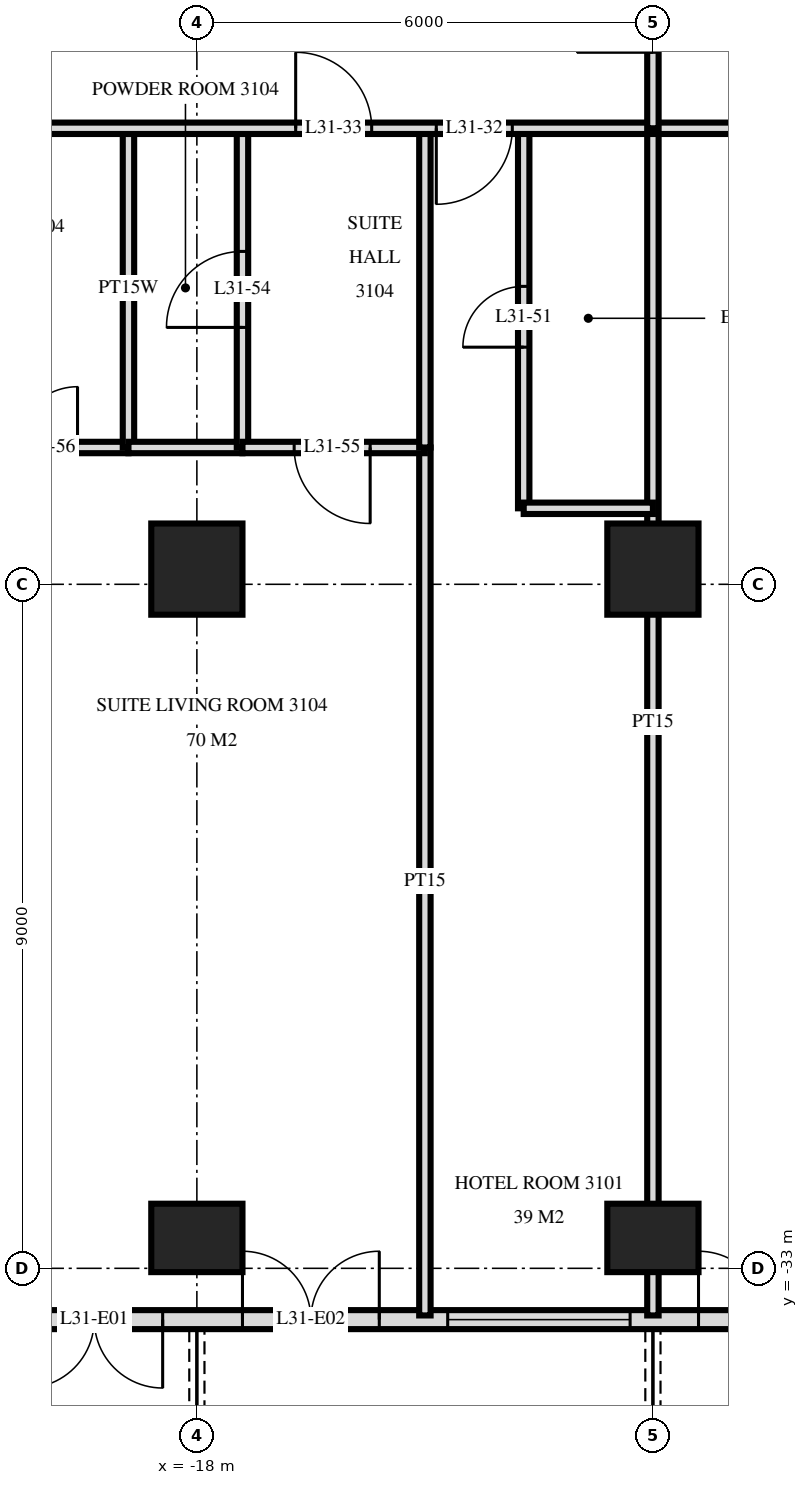
"""IFC4 building model, lengths in metres.
Left out: names, types, materials, properties, quantities, classifications, styles, units other than length and angle.
Written with IfcOpenShell. Run it as: python <this file> out.ifc"""

import sys

from ifc_helpers import new_model, si_unit, direction, frame, frame_2d, origin, origin_2d, place, context, subcontext, project, spatial, rectangle, extrude, element, fill, save


model = new_model("IFC4")
c1 = context("Model", 3, precision=1e-05, world=origin(), true_north=direction((0.0, 1.0)))
c2 = subcontext(c1, "Body", "Model", "MODEL_VIEW")
j1 = project(units=[si_unit("LENGTHUNIT", "METRE"), si_unit("PLANEANGLEUNIT", "RADIAN")], contexts=[c1])
p1 = place(None, origin())
s1 = spatial("IfcSite", under=j1, at=p1, CompositionType="ELEMENT")
p2 = place(p1, origin())
s2 = spatial("IfcBuilding", under=s1, at=p2, CompositionType="ELEMENT")
p3 = place(p2, frame((0.0, 0.0, 123.6)))
s3 = spatial("IfcBuildingStorey", under=s2, at=p3, CompositionType="ELEMENT", Elevation=123.6)
p4 = place(p3, frame((-18.0, -32.6, 0.0), z_axis=(0.0, 0.0, 1.0), x_axis=(1.0, 0.0, 0.0)))
e1 = element("IfcColumn", 1, at=p4, inside=s3, PredefinedType="COLUMN", context=c2, shape_type="SweptSolid", body=[
    extrude(rectangle(XDim=1.2, YDim=0.9, at=origin_2d()), origin(), (0.0, 0.0, 1.0), 3.6),
])
p5 = place(p3, frame((-18.0, -23.8, 0.0), z_axis=(0.0, 0.0, 1.0), x_axis=(1.0, 0.0, 0.0)))
e2 = element("IfcColumn", 2, at=p5, inside=s3, PredefinedType="COLUMN", context=c2, shape_type="SweptSolid", body=[
    extrude(rectangle(XDim=1.2, YDim=1.2, at=origin_2d()), origin(), (0.0, 0.0, 1.0), 3.6),
])
p6 = place(p3, frame((-12.0, -32.6, 0.0), z_axis=(0.0, 0.0, 1.0), x_axis=(1.0, 0.0, 0.0)))
e3 = element("IfcColumn", 3, at=p6, inside=s3, PredefinedType="COLUMN", context=c2, shape_type="SweptSolid", body=[
    extrude(rectangle(XDim=1.2, YDim=0.9, at=origin_2d()), origin(), (0.0, 0.0, 1.0), 3.6),
])
p7 = place(p3, frame((-12.0, -23.8, 0.0), z_axis=(0.0, 0.0, 1.0), x_axis=(1.0, 0.0, 0.0)))
e4 = element("IfcColumn", 4, at=p7, inside=s3, PredefinedType="COLUMN", context=c2, shape_type="SweptSolid", body=[
    extrude(rectangle(XDim=1.2, YDim=1.2, at=origin_2d()), origin(), (0.0, 0.0, 1.0), 3.6),
])
p8 = place(p3, frame((-23.675, -33.675, 0.0), z_axis=(0.0, 0.0, 1.0), x_axis=(1.0, 0.0, 0.0)))
e5 = element("IfcWall", 5, at=p8, inside=s3, PredefinedType="SOLIDWALL", context=c2, shape_type="SweptSolid", body=[
    extrude(rectangle(XDim=47.351, YDim=0.25, at=frame_2d((23.675, 0.0))), origin(), (0.0, 0.0, 1.0), 3.32),
])
p9 = place(p8, frame((3.425, 0.0, 0.0)))
e6 = element("IfcOpeningElement", 6, at=p9, cuts=e5, PredefinedType="OPENING", context=c2, shape_type="SweptSolid", body=[
    extrude(rectangle(XDim=1.8, YDim=2.4, at=frame_2d((0.9, 1.2))), frame((0.0, 0.135, 0.0), z_axis=(0.0, -1.0, 0.0), x_axis=(1.0, 0.0, 0.0)), (0.0, 0.0, 1.0), 0.27),
])
p10 = place(p8, frame((6.275, 0.0, 0.0)))
e7 = element("IfcOpeningElement", 7, at=p10, cuts=e5, PredefinedType="OPENING", context=c2, shape_type="SweptSolid", body=[
    extrude(rectangle(XDim=1.8, YDim=2.4, at=frame_2d((0.9, 1.2))), frame((0.0, 0.135, 0.0), z_axis=(0.0, -1.0, 0.0), x_axis=(1.0, 0.0, 0.0)), (0.0, 0.0, 1.0), 0.27),
])
p11 = place(p8, frame((8.975, 0.0, 0.3)))
e8 = element("IfcOpeningElement", 8, at=p11, cuts=e5, PredefinedType="OPENING", context=c2, shape_type="SweptSolid", body=[
    extrude(rectangle(XDim=2.4, YDim=2.1, at=frame_2d((1.2, 1.05))), frame((0.0, 0.135, 0.0), z_axis=(0.0, -1.0, 0.0), x_axis=(1.0, 0.0, 0.0)), (0.0, 0.0, 1.0), 0.27),
])
p12 = place(p8, frame((12.275, 0.0, 0.0)))
e9 = element("IfcOpeningElement", 9, at=p12, cuts=e5, PredefinedType="OPENING", context=c2, shape_type="SweptSolid", body=[
    extrude(rectangle(XDim=1.8, YDim=2.4, at=frame_2d((0.9, 1.2))), frame((0.0, 0.135, 0.0), z_axis=(0.0, -1.0, 0.0), x_axis=(1.0, 0.0, 0.0)), (0.0, 0.0, 1.0), 0.27),
])
p13 = place(p8, frame((14.975, 0.0, 0.3)))
e10 = element("IfcOpeningElement", 10, at=p13, cuts=e5, PredefinedType="OPENING", context=c2, shape_type="SweptSolid", body=[
    extrude(rectangle(XDim=2.4, YDim=2.1, at=frame_2d((1.2, 1.05))), frame((0.0, 0.135, 0.0), z_axis=(0.0, -1.0, 0.0), x_axis=(1.0, 0.0, 0.0)), (0.0, 0.0, 1.0), 0.27),
])
p14 = place(p8, frame((17.975, 0.0, 0.3)))
e11 = element("IfcOpeningElement", 11, at=p14, cuts=e5, PredefinedType="OPENING", context=c2, shape_type="SweptSolid", body=[
    extrude(rectangle(XDim=2.4, YDim=2.1, at=frame_2d((1.2, 1.05))), frame((0.0, 0.135, 0.0), z_axis=(0.0, -1.0, 0.0), x_axis=(1.0, 0.0, 0.0)), (0.0, 0.0, 1.0), 0.27),
])
p15 = place(p8, frame((21.275, 0.0, 0.0)))
e12 = element("IfcOpeningElement", 12, at=p15, cuts=e5, PredefinedType="OPENING", context=c2, shape_type="SweptSolid", body=[
    extrude(rectangle(XDim=1.8, YDim=2.4, at=frame_2d((0.9, 1.2))), frame((0.0, 0.135, 0.0), z_axis=(0.0, -1.0, 0.0), x_axis=(1.0, 0.0, 0.0)), (0.0, 0.0, 1.0), 0.27),
])
p16 = place(p8, frame((24.275, 0.0, 0.0)))
e13 = element("IfcOpeningElement", 13, at=p16, cuts=e5, PredefinedType="OPENING", context=c2, shape_type="SweptSolid", body=[
    extrude(rectangle(XDim=1.8, YDim=2.4, at=frame_2d((0.9, 1.2))), frame((0.0, 0.135, 0.0), z_axis=(0.0, -1.0, 0.0), x_axis=(1.0, 0.0, 0.0)), (0.0, 0.0, 1.0), 0.27),
])
p17 = place(p8, frame((26.975, 0.0, 0.3)))
e14 = element("IfcOpeningElement", 14, at=p17, cuts=e5, PredefinedType="OPENING", context=c2, shape_type="SweptSolid", body=[
    extrude(rectangle(XDim=2.4, YDim=2.1, at=frame_2d((1.2, 1.05))), frame((0.0, 0.135, 0.0), z_axis=(0.0, -1.0, 0.0), x_axis=(1.0, 0.0, 0.0)), (0.0, 0.0, 1.0), 0.27),
])
p18 = place(p8, frame((30.275, 0.0, 0.0)))
e15 = element("IfcOpeningElement", 15, at=p18, cuts=e5, PredefinedType="OPENING", context=c2, shape_type="SweptSolid", body=[
    extrude(rectangle(XDim=1.8, YDim=2.4, at=frame_2d((0.9, 1.2))), frame((0.0, 0.135, 0.0), z_axis=(0.0, -1.0, 0.0), x_axis=(1.0, 0.0, 0.0)), (0.0, 0.0, 1.0), 0.27),
])
p19 = place(p8, frame((32.975, 0.0, 0.3)))
e16 = element("IfcOpeningElement", 16, at=p19, cuts=e5, PredefinedType="OPENING", context=c2, shape_type="SweptSolid", body=[
    extrude(rectangle(XDim=2.4, YDim=2.1, at=frame_2d((1.2, 1.05))), frame((0.0, 0.135, 0.0), z_axis=(0.0, -1.0, 0.0), x_axis=(1.0, 0.0, 0.0)), (0.0, 0.0, 1.0), 0.27),
])
p20 = place(p8, frame((36.275, 0.0, 0.0)))
e17 = element("IfcOpeningElement", 17, at=p20, cuts=e5, PredefinedType="OPENING", context=c2, shape_type="SweptSolid", body=[
    extrude(rectangle(XDim=1.8, YDim=2.4, at=frame_2d((0.9, 1.2))), frame((0.0, 0.135, 0.0), z_axis=(0.0, -1.0, 0.0), x_axis=(1.0, 0.0, 0.0)), (0.0, 0.0, 1.0), 0.27),
])
p21 = place(p8, frame((38.975, 0.0, 0.3)))
e18 = element("IfcOpeningElement", 18, at=p21, cuts=e5, PredefinedType="OPENING", context=c2, shape_type="SweptSolid", body=[
    extrude(rectangle(XDim=2.4, YDim=2.1, at=frame_2d((1.2, 1.05))), frame((0.0, 0.135, 0.0), z_axis=(0.0, -1.0, 0.0), x_axis=(1.0, 0.0, 0.0)), (0.0, 0.0, 1.0), 0.27),
])
p22 = place(p8, frame((41.975, 0.0, 0.3)))
e19 = element("IfcOpeningElement", 19, at=p22, cuts=e5, PredefinedType="OPENING", context=c2, shape_type="SweptSolid", body=[
    extrude(rectangle(XDim=2.4, YDim=2.1, at=frame_2d((1.2, 1.05))), frame((0.0, 0.135, 0.0), z_axis=(0.0, -1.0, 0.0), x_axis=(1.0, 0.0, 0.0)), (0.0, 0.0, 1.0), 0.27),
])
p23 = place(p8, frame((45.125, 0.0, 0.0)))
e20 = element("IfcOpeningElement", 20, at=p23, cuts=e5, PredefinedType="OPENING", context=c2, shape_type="SweptSolid", body=[
    extrude(rectangle(XDim=1.8, YDim=2.4, at=frame_2d((0.9, 1.2))), frame((0.0, 0.135, 0.0), z_axis=(0.0, -1.0, 0.0), x_axis=(1.0, 0.0, 0.0)), (0.0, 0.0, 1.0), 0.27),
])
p24 = place(p3, frame((-12.0, -18.0, 0.0), z_axis=(0.0, 0.0, 1.0), x_axis=(0.0, 1.0, 0.0)))
e21 = element("IfcWall", 21, at=p24, inside=s3, PredefinedType="PARTITIONING", context=c2, shape_type="SweptSolid", body=[
    extrude(rectangle(XDim=2.95, YDim=0.15, at=frame_2d((1.475, 0.0))), origin(), (0.0, 0.0, 1.0), 3.32),
])
p25 = place(p24, frame((1.0, 0.0, 0.0)))
e22 = element("IfcOpeningElement", 22, at=p25, cuts=e21, PredefinedType="OPENING", context=c2, shape_type="SweptSolid", body=[
    extrude(rectangle(XDim=1.0, YDim=2.1, at=frame_2d((0.5, 1.05))), frame((0.0, 0.085, 0.0), z_axis=(0.0, -1.0, 0.0), x_axis=(1.0, 0.0, 0.0)), (0.0, 0.0, 1.0), 0.17),
])
p26 = place(p3, frame((-12.0, -33.62, 0.0), z_axis=(0.0, 0.0, 1.0), x_axis=(0.0, 1.0, 0.0)))
e23 = element("IfcWall", 23, at=p26, inside=s3, PredefinedType="PARTITIONING", context=c2, shape_type="SweptSolid", body=[
    extrude(rectangle(XDim=15.62, YDim=0.15, at=frame_2d((7.81, 0.0))), origin(), (0.0, 0.0, 1.0), 3.32),
])
p27 = place(p3, frame((-13.7, -23.0, 0.0), z_axis=(0.0, 0.0, 1.0), x_axis=(0.0, 1.0, 0.0)))
e24 = element("IfcWall", 24, at=p27, inside=s3, PredefinedType="PARTITIONING", context=c2, shape_type="SweptSolid", body=[
    extrude(rectangle(XDim=5.0, YDim=0.15, at=frame_2d((2.5, 0.0))), origin(), (0.0, 0.0, 1.0), 3.32),
])
p28 = place(p27, frame((2.12, 0.0, 0.0)))
e25 = element("IfcOpeningElement", 25, at=p28, cuts=e24, PredefinedType="OPENING", context=c2, shape_type="SweptSolid", body=[
    extrude(rectangle(XDim=0.8, YDim=2.1, at=frame_2d((0.4, 1.05))), frame((0.0, 0.085, 0.0), z_axis=(0.0, -1.0, 0.0), x_axis=(1.0, 0.0, 0.0)), (0.0, 0.0, 1.0), 0.17),
])
p29 = place(p3, frame((-15.0, -22.2, 0.0), z_axis=(0.0, 0.0, 1.0), x_axis=(0.0, 1.0, 0.0)))
e26 = element("IfcWall", 26, at=p29, inside=s3, PredefinedType="PARTITIONING", context=c2, shape_type="SweptSolid", body=[
    extrude(rectangle(XDim=4.2, YDim=0.15, at=frame_2d((2.1, 0.0))), origin(), (0.0, 0.0, 1.0), 3.32),
])
p30 = place(p3, frame((-15.0, -33.62, 0.0), z_axis=(0.0, 0.0, 1.0), x_axis=(0.0, 1.0, 0.0)))
e27 = element("IfcWall", 27, at=p30, inside=s3, PredefinedType="PARTITIONING", context=c2, shape_type="SweptSolid", body=[
    extrude(rectangle(XDim=11.42, YDim=0.15, at=frame_2d((5.71, 0.0))), origin(), (0.0, 0.0, 1.0), 3.32),
])
p31 = place(p3, frame((-17.4, -22.2, 0.0), z_axis=(0.0, 0.0, 1.0), x_axis=(0.0, 1.0, 0.0)))
e28 = element("IfcWall", 28, at=p31, inside=s3, PredefinedType="PARTITIONING", context=c2, shape_type="SweptSolid", body=[
    extrude(rectangle(XDim=4.2, YDim=0.15, at=frame_2d((2.1, 0.0))), origin(), (0.0, 0.0, 1.0), 3.32),
])
p32 = place(p31, frame((1.58, 0.0, 0.0)))
e29 = element("IfcOpeningElement", 29, at=p32, cuts=e28, PredefinedType="OPENING", context=c2, shape_type="SweptSolid", body=[
    extrude(rectangle(XDim=1.0, YDim=2.1, at=frame_2d((0.5, 1.05))), frame((0.0, 0.085, 0.0), z_axis=(0.0, -1.0, 0.0), x_axis=(1.0, 0.0, 0.0)), (0.0, 0.0, 1.0), 0.17),
])
p33 = place(p3, frame((-18.9, -22.2, 0.0), z_axis=(0.0, 0.0, 1.0), x_axis=(0.0, 1.0, 0.0)))
e30 = element("IfcWall", 30, at=p33, inside=s3, PredefinedType="PLUMBINGWALL", context=c2, shape_type="SweptSolid", body=[
    extrude(rectangle(XDim=4.2, YDim=0.15, at=frame_2d((2.1, 0.0))), origin(), (0.0, 0.0, 1.0), 3.32),
])
p34 = place(p3, frame((-13.7, -23.0, 0.0), z_axis=(0.0, 0.0, 1.0), x_axis=(1.0, 0.0, 0.0)))
e31 = element("IfcWall", 31, at=p34, inside=s3, PredefinedType="PARTITIONING", context=c2, shape_type="SweptSolid", body=[
    extrude(rectangle(XDim=1.7, YDim=0.15, at=frame_2d((0.85, 0.0))), origin(), (0.0, 0.0, 1.0), 3.32),
])
p35 = place(p3, frame((-17.4, -22.2, 0.0), z_axis=(0.0, 0.0, 1.0), x_axis=(1.0, 0.0, 0.0)))
e32 = element("IfcWall", 32, at=p35, inside=s3, PredefinedType="PARTITIONING", context=c2, shape_type="SweptSolid", body=[
    extrude(rectangle(XDim=2.4, YDim=0.15, at=frame_2d((1.2, 0.0))), origin(), (0.0, 0.0, 1.0), 3.32),
])
p36 = place(p35, frame((0.68, 0.0, 0.0)))
e33 = element("IfcOpeningElement", 33, at=p36, cuts=e32, PredefinedType="OPENING", context=c2, shape_type="SweptSolid", body=[
    extrude(rectangle(XDim=1.0, YDim=2.1, at=frame_2d((0.5, 1.05))), frame((0.0, 0.085, 0.0), z_axis=(0.0, -1.0, 0.0), x_axis=(1.0, 0.0, 0.0)), (0.0, 0.0, 1.0), 0.17),
])
p37 = place(p3, frame((-28.02, -22.2, 0.0), z_axis=(0.0, 0.0, 1.0), x_axis=(1.0, 0.0, 0.0)))
e34 = element("IfcWall", 34, at=p37, inside=s3, PredefinedType="PARTITIONING", context=c2, shape_type="SweptSolid", body=[
    extrude(rectangle(XDim=9.12, YDim=0.15, at=frame_2d((4.56, 0.0))), origin(), (0.0, 0.0, 1.0), 3.32),
])
p38 = place(p37, frame((7.65, 0.0, 0.0)))
e35 = element("IfcOpeningElement", 35, at=p38, cuts=e34, PredefinedType="OPENING", context=c2, shape_type="SweptSolid", body=[
    extrude(rectangle(XDim=0.8, YDim=2.1, at=frame_2d((0.4, 1.05))), frame((0.0, 0.085, 0.0), z_axis=(0.0, -1.0, 0.0), x_axis=(1.0, 0.0, 0.0)), (0.0, 0.0, 1.0), 0.17),
])
p39 = place(p37, frame((2.5, 0.0, 0.0)))
e36 = element("IfcOpeningElement", 36, at=p39, cuts=e34, PredefinedType="OPENING", context=c2, shape_type="SweptSolid", body=[
    extrude(rectangle(XDim=0.9, YDim=2.1, at=frame_2d((0.45, 1.05))), frame((0.0, 0.085, 0.0), z_axis=(0.0, -1.0, 0.0), x_axis=(1.0, 0.0, 0.0)), (0.0, 0.0, 1.0), 0.17),
])
p40 = place(p3, frame((-18.9, -22.2, 0.0), z_axis=(0.0, 0.0, 1.0), x_axis=(1.0, 0.0, 0.0)))
e37 = element("IfcWall", 37, at=p40, inside=s3, PredefinedType="PLUMBINGWALL", context=c2, shape_type="SweptSolid", body=[
    extrude(rectangle(XDim=1.5, YDim=0.15, at=frame_2d((0.75, 0.0))), origin(), (0.0, 0.0, 1.0), 3.32),
])
p41 = place(p3, frame((-28.02, -18.0, 0.0), z_axis=(0.0, 0.0, 1.0), x_axis=(1.0, 0.0, 0.0)))
e38 = element("IfcWall", 38, at=p41, inside=s3, PredefinedType="PARTITIONING", context=c2, shape_type="SweptSolid", body=[
    extrude(rectangle(XDim=56.04, YDim=0.15, at=frame_2d((28.02, 0.0))), origin(), (0.0, 0.0, 1.0), 3.32),
])
p42 = place(p41, frame((13.17, 0.0, 0.0)))
e39 = element("IfcOpeningElement", 39, at=p42, cuts=e38, PredefinedType="OPENING", context=c2, shape_type="SweptSolid", body=[
    extrude(rectangle(XDim=1.0, YDim=2.1, at=frame_2d((0.5, 1.05))), frame((0.0, 0.085, 0.0), z_axis=(0.0, -1.0, 0.0), x_axis=(1.0, 0.0, 0.0)), (0.0, 0.0, 1.0), 0.17),
])
p43 = place(p41, frame((11.32, 0.0, 0.0)))
e40 = element("IfcOpeningElement", 40, at=p43, cuts=e38, PredefinedType="OPENING", context=c2, shape_type="SweptSolid", body=[
    extrude(rectangle(XDim=1.0, YDim=2.1, at=frame_2d((0.5, 1.05))), frame((0.0, 0.085, 0.0), z_axis=(0.0, -1.0, 0.0), x_axis=(1.0, 0.0, 0.0)), (0.0, 0.0, 1.0), 0.17),
])
p44 = place(p41, frame((41.87, 0.0, 0.0)))
e41 = element("IfcOpeningElement", 41, at=p44, cuts=e38, PredefinedType="OPENING", context=c2, shape_type="SweptSolid", body=[
    extrude(rectangle(XDim=1.0, YDim=2.1, at=frame_2d((0.5, 1.05))), frame((0.0, 0.085, 0.0), z_axis=(0.0, -1.0, 0.0), x_axis=(1.0, 0.0, 0.0)), (0.0, 0.0, 1.0), 0.17),
])
p45 = place(p41, frame((43.17, 0.0, 0.0)))
e42 = element("IfcOpeningElement", 42, at=p45, cuts=e38, PredefinedType="OPENING", context=c2, shape_type="SweptSolid", body=[
    extrude(rectangle(XDim=1.0, YDim=2.1, at=frame_2d((0.5, 1.05))), frame((0.0, 0.085, 0.0), z_axis=(0.0, -1.0, 0.0), x_axis=(1.0, 0.0, 0.0)), (0.0, 0.0, 1.0), 0.17),
])
p46 = place(p41, frame((46.72, 0.0, 0.0)))
e43 = element("IfcOpeningElement", 43, at=p46, cuts=e38, PredefinedType="OPENING", context=c2, shape_type="SweptSolid", body=[
    extrude(rectangle(XDim=1.0, YDim=2.1, at=frame_2d((0.5, 1.05))), frame((0.0, 0.085, 0.0), z_axis=(0.0, -1.0, 0.0), x_axis=(1.0, 0.0, 0.0)), (0.0, 0.0, 1.0), 0.17),
])
p47 = place(p41, frame((21.52, 0.0, 0.0)))
e44 = element("IfcOpeningElement", 44, at=p47, cuts=e38, PredefinedType="OPENING", context=c2, shape_type="SweptSolid", body=[
    extrude(rectangle(XDim=1.0, YDim=2.1, at=frame_2d((0.5, 1.05))), frame((0.0, 0.085, 0.0), z_axis=(0.0, -1.0, 0.0), x_axis=(1.0, 0.0, 0.0)), (0.0, 0.0, 1.0), 0.17),
])
p48 = place(p41, frame((33.52, 0.0, 0.0)))
e45 = element("IfcOpeningElement", 45, at=p48, cuts=e38, PredefinedType="OPENING", context=c2, shape_type="SweptSolid", body=[
    extrude(rectangle(XDim=1.0, YDim=2.1, at=frame_2d((0.5, 1.05))), frame((0.0, 0.085, 0.0), z_axis=(0.0, -1.0, 0.0), x_axis=(1.0, 0.0, 0.0)), (0.0, 0.0, 1.0), 0.17),
])
p49 = place(p9, frame((0.9, 0.0, 0.0), z_axis=(0.0, 0.0, 1.0), x_axis=(-1.0, 0.0, 0.0)))
e46 = element("IfcDoor", 46, at=p49, inside=s3, OperationType="DOUBLE_DOOR_SINGLE_SWING", PredefinedType="DOOR", context=c2, shape_type="SweptSolid", body=[
    extrude(rectangle(XDim=1.8, YDim=2.4, at=frame_2d((0.0, 1.2))), frame((0.0, -0.025, 0.0), z_axis=(0.0, 1.0, 0.0), x_axis=(-1.0, 0.0, 0.0)), (0.0, 0.0, 1.0), 0.05),
])
fill(e6, e46)
p50 = place(p10, origin())
e47 = element("IfcDoor", 47, at=p50, inside=s3, OperationType="DOUBLE_DOOR_SINGLE_SWING", PredefinedType="DOOR", context=c2, shape_type="SweptSolid", body=[
    extrude(rectangle(XDim=1.8, YDim=2.4, at=frame_2d((0.9, 1.2))), frame((0.0, 0.025, 0.0), z_axis=(0.0, -1.0, 0.0), x_axis=(1.0, 0.0, 0.0)), (0.0, 0.0, 1.0), 0.05),
])
fill(e7, e47)
p51 = place(p11, origin())
e48 = element("IfcWindow", 48, at=p51, inside=s3, PartitioningType="SINGLE_PANEL", PredefinedType="WINDOW", context=c2, shape_type="SweptSolid", body=[
    extrude(rectangle(XDim=2.4, YDim=2.1, at=frame_2d((1.2, 1.05))), frame((0.0, 0.03, 0.0), z_axis=(0.0, -1.0, 0.0), x_axis=(1.0, 0.0, 0.0)), (0.0, 0.0, 1.0), 0.06),
])
fill(e8, e48)
p52 = place(p12, origin())
e49 = element("IfcDoor", 49, at=p52, inside=s3, OperationType="DOUBLE_DOOR_SINGLE_SWING", PredefinedType="DOOR", context=c2, shape_type="SweptSolid", body=[
    extrude(rectangle(XDim=1.8, YDim=2.4, at=frame_2d((0.9, 1.2))), frame((0.0, 0.025, 0.0), z_axis=(0.0, -1.0, 0.0), x_axis=(1.0, 0.0, 0.0)), (0.0, 0.0, 1.0), 0.05),
])
fill(e9, e49)
p53 = place(p42, frame((0.5, 0.0, 0.0), z_axis=(0.0, 0.0, 1.0), x_axis=(-1.0, 0.0, 0.0)))
e50 = element("IfcDoor", 50, at=p53, inside=s3, OperationType="SINGLE_SWING_LEFT", PredefinedType="DOOR", context=c2, shape_type="SweptSolid", body=[
    extrude(rectangle(XDim=1.0, YDim=2.1, at=frame_2d((0.0, 1.05))), frame((0.0, -0.025, 0.0), z_axis=(0.0, 1.0, 0.0), x_axis=(-1.0, 0.0, 0.0)), (0.0, 0.0, 1.0), 0.05),
])
fill(e39, e50)
p54 = place(p43, origin())
e51 = element("IfcDoor", 51, at=p54, inside=s3, OperationType="SINGLE_SWING_RIGHT", PredefinedType="DOOR", context=c2, shape_type="SweptSolid", body=[
    extrude(rectangle(XDim=1.0, YDim=2.1, at=frame_2d((0.5, 1.05))), frame((0.0, 0.025, 0.0), z_axis=(0.0, -1.0, 0.0), x_axis=(1.0, 0.0, 0.0)), (0.0, 0.0, 1.0), 0.05),
])
fill(e40, e51)
p55 = place(p28, origin())
e52 = element("IfcDoor", 52, at=p55, inside=s3, OperationType="SINGLE_SWING_RIGHT", PredefinedType="DOOR", context=c2, shape_type="SweptSolid", body=[
    extrude(rectangle(XDim=0.8, YDim=2.1, at=frame_2d((0.4, 1.05))), frame((0.0, 0.025, 0.0), z_axis=(0.0, -1.0, 0.0), x_axis=(1.0, 0.0, 0.0)), (0.0, 0.0, 1.0), 0.05),
])
fill(e25, e52)
p56 = place(p32, origin())
e53 = element("IfcDoor", 53, at=p56, inside=s3, OperationType="SINGLE_SWING_RIGHT", PredefinedType="DOOR", context=c2, shape_type="SweptSolid", body=[
    extrude(rectangle(XDim=1.0, YDim=2.1, at=frame_2d((0.5, 1.05))), frame((0.0, 0.025, 0.0), z_axis=(0.0, -1.0, 0.0), x_axis=(1.0, 0.0, 0.0)), (0.0, 0.0, 1.0), 0.05),
])
fill(e29, e53)
p57 = place(p36, frame((0.5, 0.0, 0.0), z_axis=(0.0, 0.0, 1.0), x_axis=(-1.0, 0.0, 0.0)))
e54 = element("IfcDoor", 54, at=p57, inside=s3, OperationType="SINGLE_SWING_RIGHT", PredefinedType="DOOR", context=c2, shape_type="SweptSolid", body=[
    extrude(rectangle(XDim=1.0, YDim=2.1, at=frame_2d((0.0, 1.05))), frame((0.0, -0.025, 0.0), z_axis=(0.0, 1.0, 0.0), x_axis=(-1.0, 0.0, 0.0)), (0.0, 0.0, 1.0), 0.05),
])
fill(e33, e54)
p58 = place(p38, origin())
e55 = element("IfcDoor", 55, at=p58, inside=s3, OperationType="SINGLE_SWING_LEFT", PredefinedType="DOOR", context=c2, shape_type="SweptSolid", body=[
    extrude(rectangle(XDim=0.8, YDim=2.1, at=frame_2d((0.4, 1.05))), frame((0.0, 0.025, 0.0), z_axis=(0.0, -1.0, 0.0), x_axis=(1.0, 0.0, 0.0)), (0.0, 0.0, 1.0), 0.05),
])
fill(e35, e55)
save(model, sys.argv[1])
